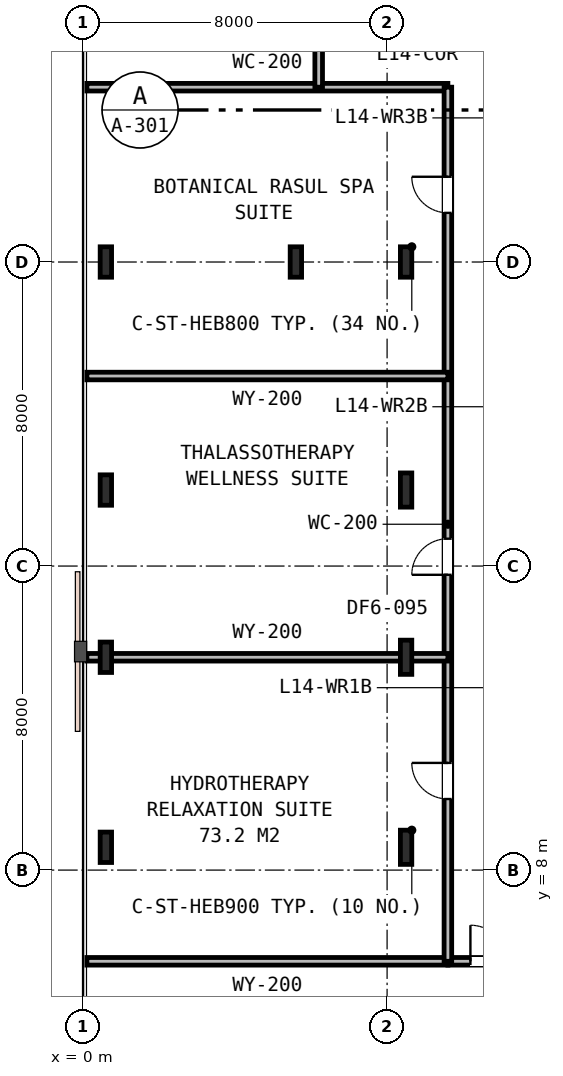
"""IFC4 building model, lengths in metres.
Left out: names, types, materials, properties, quantities, classifications, styles, units other than length and angle.
Written with IfcOpenShell. Run it as: python <this file> out.ifc"""

import sys

from ifc_helpers import new_model, si_unit, direction, frame, frame_2d, origin, origin_2d, place, context, subcontext, project, spatial, rectangle, i_section, extrude, element, fill, save


model = new_model("IFC4")
c1 = context("Model", 3, precision=1e-05, world=origin(), true_north=direction((0.0, 1.0)))
c2 = subcontext(c1, "Body", "Model", "MODEL_VIEW")
j1 = project(units=[si_unit("LENGTHUNIT", "METRE"), si_unit("PLANEANGLEUNIT", "RADIAN")], contexts=[c1])
p1 = place(None, origin())
s1 = spatial("IfcSite", under=j1, at=p1, CompositionType="ELEMENT")
p2 = place(p1, origin())
s2 = spatial("IfcBuilding", under=s1, at=p2, CompositionType="ELEMENT")
p3 = place(p2, frame((0.0, 0.0, 58.2)))
s3 = spatial("IfcBuildingStorey", under=s2, at=p3, CompositionType="ELEMENT", Elevation=58.2)
for number, where, z_axis, x_axis in (
    (1, (8.5, 24.0, 0.0), (0.0, 0.0, 1.0), (1.0, 0.0, 0.0)),
    (2, (5.6, 24.0, 0.0), (0.0, 0.0, 1.0), (1.0, 0.0, 0.0)),
    (3, (0.6, 24.0, 0.0), (0.0, 0.0, 1.0), (1.0, 0.0, 0.0)),
    (4, (0.6, 8.6, 0.0), (0.0, 0.0, 1.0), (1.0, 0.0, 0.0)),
    (5, (0.6, 13.6, 0.0), (0.0, 0.0, 1.0), (1.0, 0.0, 0.0)),
    (6, (0.6, 18.0, 0.0), (0.0, 0.0, 1.0), (1.0, 0.0, 0.0)),
):
    element("IfcColumn", number, at=place(p3, frame(where, z_axis=z_axis, x_axis=x_axis)), inside=s3, PredefinedType="COLUMN", context=c2, shape_type="SweptSolid", body=[
        extrude(i_section(OverallWidth=0.3, OverallDepth=0.8, WebThickness=0.018, FlangeThickness=0.033, FilletRadius=0.03, at=origin_2d()), origin(), (0.0, 0.0, 1.0), 3.6),
    ])
for number, where, z_axis, x_axis in (
    (7, (8.5, 8.6, 0.0), (0.0, 0.0, 1.0), (1.0, 0.0, 0.0)),
    (8, (8.5, 13.6, 0.0), (0.0, 0.0, 1.0), (1.0, 0.0, 0.0)),
    (9, (8.5, 18.0, 0.0), (0.0, 0.0, 1.0), (1.0, 0.0, 0.0)),
):
    element("IfcColumn", number, at=place(p3, frame(where, z_axis=z_axis, x_axis=x_axis)), inside=s3, PredefinedType="COLUMN", context=c2, shape_type="SweptSolid", body=[
        extrude(i_section(OverallWidth=0.3, OverallDepth=0.9, WebThickness=0.018, FlangeThickness=0.035, FilletRadius=0.03, at=origin_2d()), origin(), (0.0, 0.0, 1.0), 3.6),
    ])
p4 = place(p3, frame((0.1, 28.6, 0.0), z_axis=(0.0, 0.0, 1.0), x_axis=(1.0, 0.0, 0.0)))
e10 = element("IfcWall", 10, at=p4, inside=s3, PredefinedType="PARTITIONING", context=c2, shape_type="SweptSolid", body=[
    extrude(rectangle(XDim=9.5, YDim=0.2, at=frame_2d((4.75, 0.0))), origin(), (0.0, 0.0, 1.0), 2.82),
])
p5 = place(p3, frame((6.2, 28.6, 0.0), z_axis=(0.0, 0.0, 1.0), x_axis=(0.0, 1.0, 0.0)))
e11 = element("IfcWall", 11, at=p5, inside=s3, PredefinedType="PARTITIONING", context=c2, shape_type="SweptSolid", body=[
    extrude(rectangle(XDim=12.4, YDim=0.2, at=frame_2d((6.2, 0.0))), origin(), (0.0, 0.0, 1.0), 2.82),
])
p6 = place(p5, frame((3.182, 0.0, 0.0)))
e12 = element("IfcOpeningElement", 12, at=p6, cuts=e11, PredefinedType="OPENING", context=c2, shape_type="SweptSolid", body=[
    extrude(rectangle(XDim=0.95, YDim=2.15, at=frame_2d((0.475, 1.075))), frame((0.0, 0.11, 0.0), z_axis=(0.0, -1.0, 0.0), x_axis=(1.0, 0.0, 0.0)), (0.0, 0.0, 1.0), 0.22),
])
p7 = place(p5, frame((6.075, 0.0, 0.0)))
e13 = element("IfcOpeningElement", 13, at=p7, cuts=e11, PredefinedType="OPENING", context=c2, shape_type="SweptSolid", body=[
    extrude(rectangle(XDim=0.95, YDim=2.15, at=frame_2d((0.475, 1.075))), frame((0.0, 0.11, 0.0), z_axis=(0.0, -1.0, 0.0), x_axis=(1.0, 0.0, 0.0)), (0.0, 0.0, 1.0), 0.22),
])
p8 = place(p5, frame((8.966, 0.0, 0.0)))
e14 = element("IfcOpeningElement", 14, at=p8, cuts=e11, PredefinedType="OPENING", context=c2, shape_type="SweptSolid", body=[
    extrude(rectangle(XDim=0.95, YDim=2.15, at=frame_2d((0.475, 1.075))), frame((0.0, 0.11, 0.0), z_axis=(0.0, -1.0, 0.0), x_axis=(1.0, 0.0, 0.0)), (0.0, 0.0, 1.0), 0.22),
])
p9 = place(p3, frame((0.1, 5.6, 0.0), z_axis=(0.0, 0.0, 1.0), x_axis=(1.0, 0.0, 0.0)))
e15 = element("IfcWall", 15, at=p9, inside=s3, PredefinedType="PARTITIONING", context=c2, shape_type="SweptSolid", body=[
    extrude(rectangle(XDim=9.5, YDim=0.2, at=frame_2d((4.75, 0.0))), origin(), (0.0, 0.0, 1.0), 2.93),
])
p10 = place(p3, frame((9.6, 5.6, 0.0), z_axis=(0.0, 0.0, 1.0), x_axis=(1.0, 0.0, 0.0)))
e16 = element("IfcWall", 16, at=p10, inside=s3, PredefinedType="PARTITIONING", context=c2, shape_type="SweptSolid", body=[
    extrude(rectangle(XDim=2.2, YDim=0.2, at=frame_2d((1.1, 0.0))), origin(), (0.0, 0.0, 1.0), 3.33),
])
p11 = place(p10, frame((0.593, 0.0, 0.0)))
e17 = element("IfcOpeningElement", 17, at=p11, cuts=e16, PredefinedType="OPENING", context=c2, shape_type="SweptSolid", body=[
    extrude(rectangle(XDim=0.95, YDim=2.15, at=frame_2d((0.475, 1.075))), frame((0.0, 0.11, 0.0), z_axis=(0.0, -1.0, 0.0), x_axis=(1.0, 0.0, 0.0)), (0.0, 0.0, 1.0), 0.22),
])
p12 = place(p3, frame((9.6, 5.6, 0.0), z_axis=(0.0, 0.0, 1.0), x_axis=(0.0, 1.0, 0.0)))
e18 = element("IfcWall", 18, at=p12, inside=s3, PredefinedType="PARTITIONING", context=c2, shape_type="SweptSolid", body=[
    extrude(rectangle(XDim=23.0, YDim=0.2, at=frame_2d((11.5, 0.0))), origin(), (0.0, 0.0, 1.0), 2.82),
])
p13 = place(p12, frame((4.27, 0.0, 0.0)))
e19 = element("IfcOpeningElement", 19, at=p13, cuts=e18, PredefinedType="OPENING", context=c2, shape_type="SweptSolid", body=[
    extrude(rectangle(XDim=0.95, YDim=2.15, at=frame_2d((0.475, 1.075))), frame((0.0, 0.11, 0.0), z_axis=(0.0, -1.0, 0.0), x_axis=(1.0, 0.0, 0.0)), (0.0, 0.0, 1.0), 0.22),
])
p14 = place(p12, frame((10.17, 0.0, 0.0)))
e20 = element("IfcOpeningElement", 20, at=p14, cuts=e18, PredefinedType="OPENING", context=c2, shape_type="SweptSolid", body=[
    extrude(rectangle(XDim=0.95, YDim=2.15, at=frame_2d((0.475, 1.075))), frame((0.0, 0.11, 0.0), z_axis=(0.0, -1.0, 0.0), x_axis=(1.0, 0.0, 0.0)), (0.0, 0.0, 1.0), 0.22),
])
p15 = place(p12, frame((19.693, 0.0, 0.0)))
e21 = element("IfcOpeningElement", 21, at=p15, cuts=e18, PredefinedType="OPENING", context=c2, shape_type="SweptSolid", body=[
    extrude(rectangle(XDim=0.95, YDim=2.15, at=frame_2d((0.475, 1.075))), frame((0.0, 0.11, 0.0), z_axis=(0.0, -1.0, 0.0), x_axis=(1.0, 0.0, 0.0)), (0.0, 0.0, 1.0), 0.22),
])
for number, where, z_axis, x_axis in (
    (22, (0.1, 13.6, 0.0), (0.0, 0.0, 1.0), (1.0, 0.0, 0.0)),
    (23, (0.1, 21.0, 0.0), (0.0, 0.0, 1.0), (1.0, 0.0, 0.0)),
):
    element("IfcWall", number, at=place(p3, frame(where, z_axis=z_axis, x_axis=x_axis)), inside=s3, PredefinedType="PARTITIONING", context=c2, shape_type="SweptSolid", body=[
        extrude(rectangle(XDim=9.5, YDim=0.2, at=frame_2d((4.75, 0.0))), origin(), (0.0, 0.0, 1.0), 2.82),
    ])
p16 = place(p11, origin())
e24 = element("IfcDoor", 24, at=p16, inside=s3, OperationType="SINGLE_SWING_LEFT", PredefinedType="DOOR", context=c2, shape_type="SweptSolid", body=[
    extrude(rectangle(XDim=0.95, YDim=2.15, at=frame_2d((0.475, 1.075))), frame((0.0, 0.025, 0.0), z_axis=(0.0, -1.0, 0.0), x_axis=(1.0, 0.0, 0.0)), (0.0, 0.0, 1.0), 0.05),
])
fill(e17, e24)
p17 = place(p13, origin())
e25 = element("IfcDoor", 25, at=p17, inside=s3, OperationType="SINGLE_SWING_RIGHT", PredefinedType="DOOR", context=c2, shape_type="SweptSolid", body=[
    extrude(rectangle(XDim=0.95, YDim=2.15, at=frame_2d((0.475, 1.075))), frame((0.0, 0.025, 0.0), z_axis=(0.0, -1.0, 0.0), x_axis=(1.0, 0.0, 0.0)), (0.0, 0.0, 1.0), 0.05),
])
fill(e19, e25)
p18 = place(p14, origin())
e26 = element("IfcDoor", 26, at=p18, inside=s3, OperationType="SINGLE_SWING_LEFT", PredefinedType="DOOR", context=c2, shape_type="SweptSolid", body=[
    extrude(rectangle(XDim=0.95, YDim=2.15, at=frame_2d((0.475, 1.075))), frame((0.0, 0.025, 0.0), z_axis=(0.0, -1.0, 0.0), x_axis=(1.0, 0.0, 0.0)), (0.0, 0.0, 1.0), 0.05),
])
fill(e20, e26)
p19 = place(p15, origin())
e27 = element("IfcDoor", 27, at=p19, inside=s3, OperationType="SINGLE_SWING_RIGHT", PredefinedType="DOOR", context=c2, shape_type="SweptSolid", body=[
    extrude(rectangle(XDim=0.95, YDim=2.15, at=frame_2d((0.475, 1.075))), frame((0.0, 0.025, 0.0), z_axis=(0.0, -1.0, 0.0), x_axis=(1.0, 0.0, 0.0)), (0.0, 0.0, 1.0), 0.05),
])
fill(e21, e27)
save(model, sys.argv[1])
